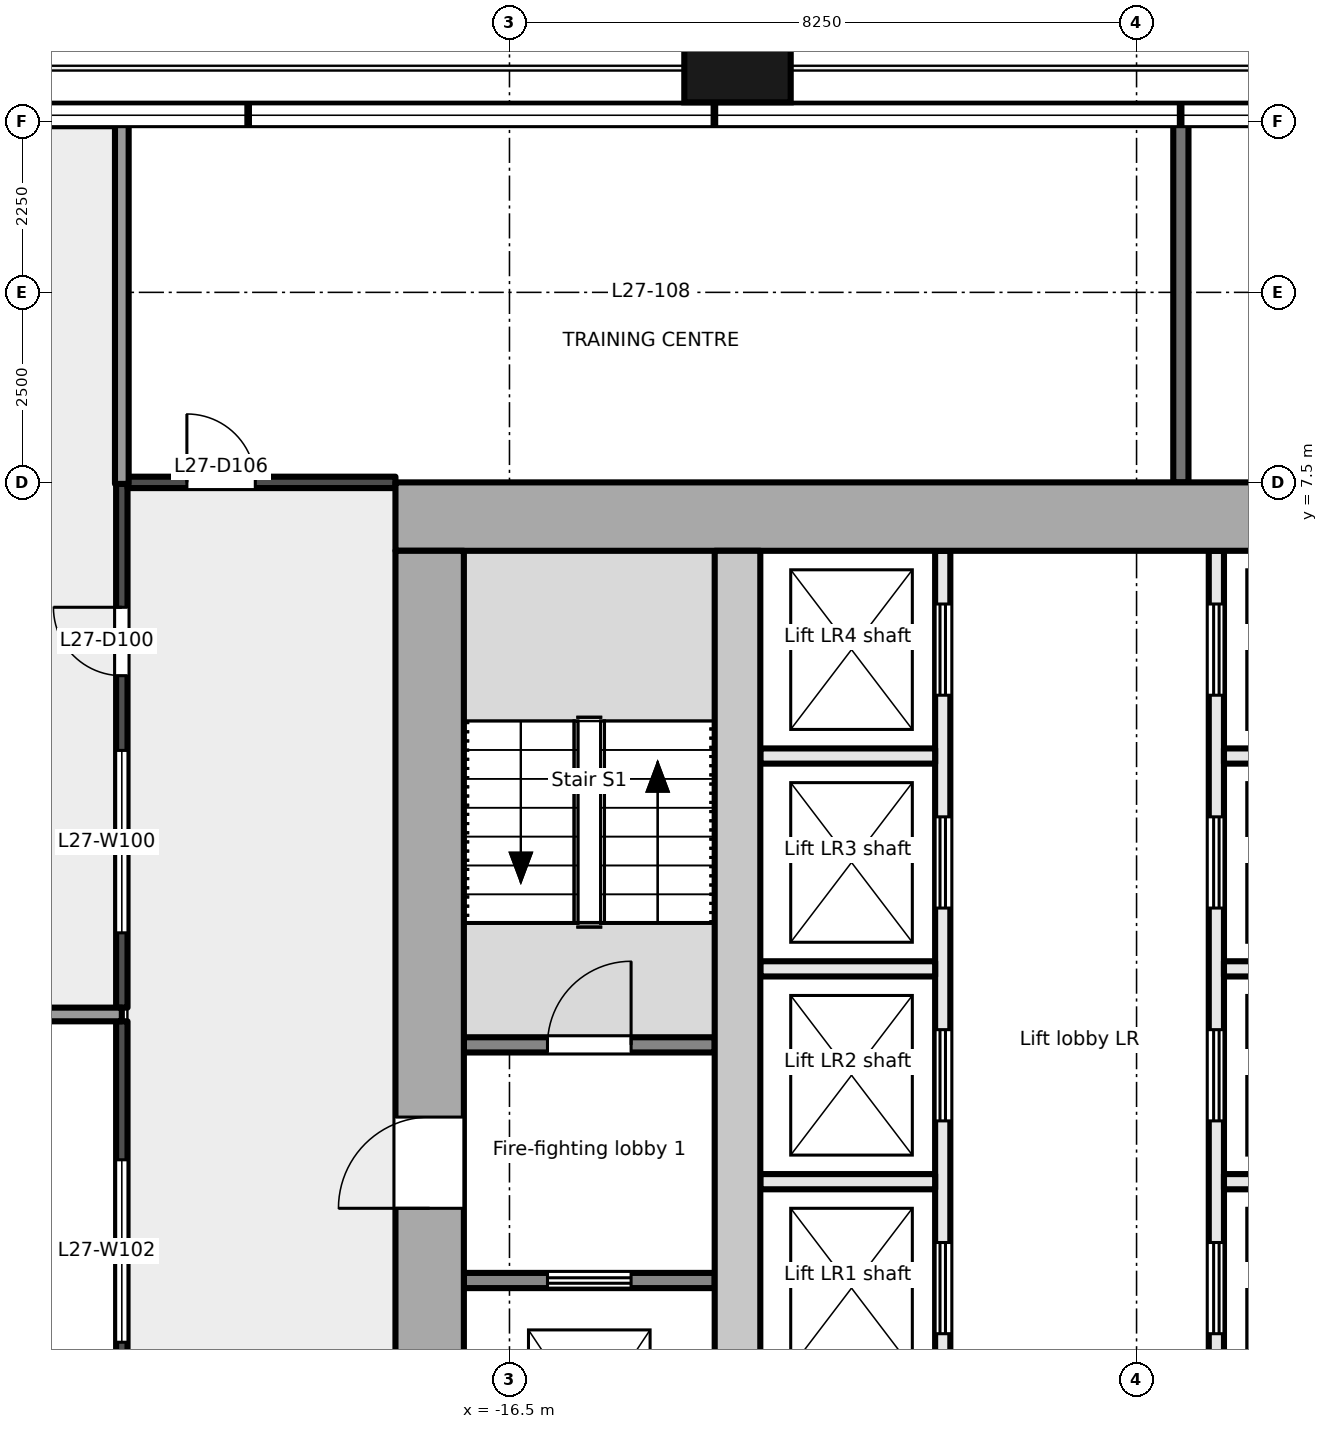
"""IFC4 building model, lengths in metres.
Left out: names, types, materials, properties, quantities, classifications, styles, units other than length and angle.
Written with IfcOpenShell. Run it as: python <this file> out.ifc"""

import sys

from ifc_helpers import new_model, si_unit, direction, frame, frame_2d, origin, origin_2d, place, context, subcontext, project, spatial, rectangle, extrude, element, fill, save


model = new_model("IFC4")
c1 = context("Model", 3, precision=1e-05, world=origin(), true_north=direction((0.0, 1.0)))
c2 = subcontext(c1, "Body", "Model", "MODEL_VIEW")
j1 = project(units=[si_unit("LENGTHUNIT", "METRE"), si_unit("PLANEANGLEUNIT", "RADIAN")], contexts=[c1])
p1 = place(None, origin())
s1 = spatial("IfcSite", under=j1, at=p1, CompositionType="ELEMENT")
p2 = place(p1, origin())
s2 = spatial("IfcBuilding", under=s1, at=p2, CompositionType="ELEMENT")
p3 = place(p2, frame((0.0, 0.0, 120.7)))
s3 = spatial("IfcBuildingStorey", under=s2, at=p3, CompositionType="ELEMENT", Elevation=120.7)
p4 = place(p3, frame((-13.5, 13.4, -0.2), z_axis=(0.0, 0.0, 1.0), x_axis=(1.0, 0.0, 0.0)))
e1 = element("IfcColumn", 1, at=p4, inside=s3, PredefinedType="COLUMN", context=c2, shape_type="SweptSolid", body=[
    extrude(rectangle(XDim=1.4, YDim=1.8, at=origin_2d()), origin(), (0.0, 0.0, 1.0), 5.4),
])
p5 = place(p3, frame((-18.0, 7.05, -0.2), z_axis=(0.0, 0.0, 1.0), x_axis=(1.0, 0.0, 0.0)))
e2 = element("IfcWall", 2, at=p5, inside=s3, PredefinedType="SHEAR", context=c2, shape_type="SweptSolid", body=[
    extrude(rectangle(XDim=36.0, YDim=0.9, at=frame_2d((18.0, 0.0))), origin(), (0.0, 0.0, 1.0), 5.4),
])
p6 = place(p3, frame((-17.55, -6.6, -0.2), z_axis=(0.0, 0.0, 1.0), x_axis=(0.0, 1.0, 0.0)))
e3 = element("IfcWall", 3, at=p6, inside=s3, PredefinedType="SHEAR", context=c2, shape_type="SweptSolid", body=[
    extrude(rectangle(XDim=13.2, YDim=0.9, at=frame_2d((6.6, 0.0))), origin(), (0.0, 0.0, 1.0), 5.4),
])
p7 = place(p6, frame((4.55, 0.0, 0.2)))
e4 = element("IfcOpeningElement", 4, at=p7, cuts=e3, PredefinedType="OPENING", context=c2, shape_type="SweptSolid", body=[
    extrude(rectangle(XDim=1.2, YDim=2.1, at=frame_2d((0.6, 1.05))), frame((0.0, 0.46, 0.0), z_axis=(0.0, -1.0, 0.0), x_axis=(1.0, 0.0, 0.0)), (0.0, 0.0, 1.0), 0.921),
])
p8 = place(p3, frame((-13.5, -6.6, -0.2), z_axis=(0.0, 0.0, 1.0), x_axis=(0.0, 1.0, 0.0)))
e5 = element("IfcWall", 5, at=p8, inside=s3, PredefinedType="SHEAR", context=c2, shape_type="SweptSolid", body=[
    extrude(rectangle(XDim=13.2, YDim=0.6, at=frame_2d((6.6, 0.0))), origin(), (0.0, 0.0, 1.0), 5.4),
])
p9 = place(p3, frame((-17.1, -3.0, 0.0), z_axis=(0.0, 0.0, 1.0), x_axis=(1.0, 0.0, 0.0)))
e6 = element("IfcWall", 6, at=p9, inside=s3, PredefinedType="PARTITIONING", context=c2, shape_type="SweptSolid", body=[
    extrude(rectangle(XDim=3.3, YDim=0.2, at=frame_2d((1.65, 0.0))), origin(), (0.0, 0.0, 1.0), 5.2),
])
p10 = place(p9, frame((1.1, 0.0, 0.0)))
e7 = element("IfcOpeningElement", 7, at=p10, cuts=e6, PredefinedType="OPENING", context=c2, shape_type="SweptSolid", body=[
    extrude(rectangle(XDim=1.1, YDim=2.1, at=frame_2d((0.55, 1.05))), frame((0.0, 0.111, 0.0), z_axis=(0.0, -1.0, 0.0), x_axis=(1.0, 0.0, 0.0)), (0.0, 0.0, 1.0), 0.221),
])
p11 = place(p3, frame((-17.1, 0.1, 0.0), z_axis=(0.0, 0.0, 1.0), x_axis=(1.0, 0.0, 0.0)))
e8 = element("IfcWall", 8, at=p11, inside=s3, PredefinedType="PARTITIONING", context=c2, shape_type="SweptSolid", body=[
    extrude(rectangle(XDim=3.3, YDim=0.2, at=frame_2d((1.65, 0.0))), origin(), (0.0, 0.0, 1.0), 5.2),
])
p12 = place(p11, frame((1.1, 0.0, 0.0)))
e9 = element("IfcOpeningElement", 9, at=p12, cuts=e8, PredefinedType="OPENING", context=c2, shape_type="SweptSolid", body=[
    extrude(rectangle(XDim=1.1, YDim=2.1, at=frame_2d((0.55, 1.05))), frame((0.0, 0.111, 0.0), z_axis=(0.0, -1.0, 0.0), x_axis=(1.0, 0.0, 0.0)), (0.0, 0.0, 1.0), 0.221),
])
p13 = place(p3, frame((-10.8, -6.6, 0.0), z_axis=(0.0, 0.0, 1.0), x_axis=(0.0, 1.0, 0.0)))
e10 = element("IfcWall", 10, at=p13, inside=s3, PredefinedType="PARTITIONING", context=c2, shape_type="SweptSolid", body=[
    extrude(rectangle(XDim=13.2, YDim=0.2, at=frame_2d((6.6, 0.0))), origin(), (0.0, 0.0, 1.0), 5.2),
])
p14 = place(p13, frame((0.55, 0.0, 0.0)))
e11 = element("IfcOpeningElement", 11, at=p14, cuts=e10, PredefinedType="OPENING", context=c2, shape_type="SweptSolid", body=[
    extrude(rectangle(XDim=0.9, YDim=2.1, at=frame_2d((0.45, 1.05))), frame((0.0, 0.111, 0.0), z_axis=(0.0, -1.0, 0.0), x_axis=(1.0, 0.0, 0.0)), (0.0, 0.0, 1.0), 0.221),
])
p15 = place(p13, frame((2.9, 0.0, 0.0)))
e12 = element("IfcOpeningElement", 12, at=p15, cuts=e10, PredefinedType="OPENING", context=c2, shape_type="SweptSolid", body=[
    extrude(rectangle(XDim=1.2, YDim=2.1, at=frame_2d((0.6, 1.05))), frame((0.0, 0.111, 0.0), z_axis=(0.0, -1.0, 0.0), x_axis=(1.0, 0.0, 0.0)), (0.0, 0.0, 1.0), 0.221),
])
p16 = place(p13, frame((5.7, 0.0, 0.0)))
e13 = element("IfcOpeningElement", 13, at=p16, cuts=e10, PredefinedType="OPENING", context=c2, shape_type="SweptSolid", body=[
    extrude(rectangle(XDim=1.2, YDim=2.1, at=frame_2d((0.6, 1.05))), frame((0.0, 0.111, 0.0), z_axis=(0.0, -1.0, 0.0), x_axis=(1.0, 0.0, 0.0)), (0.0, 0.0, 1.0), 0.221),
])
p17 = place(p13, frame((8.5, 0.0, 0.0)))
e14 = element("IfcOpeningElement", 14, at=p17, cuts=e10, PredefinedType="OPENING", context=c2, shape_type="SweptSolid", body=[
    extrude(rectangle(XDim=1.2, YDim=2.1, at=frame_2d((0.6, 1.05))), frame((0.0, 0.111, 0.0), z_axis=(0.0, -1.0, 0.0), x_axis=(1.0, 0.0, 0.0)), (0.0, 0.0, 1.0), 0.221),
])
p18 = place(p13, frame((11.3, 0.0, 0.0)))
e15 = element("IfcOpeningElement", 15, at=p18, cuts=e10, PredefinedType="OPENING", context=c2, shape_type="SweptSolid", body=[
    extrude(rectangle(XDim=1.2, YDim=2.1, at=frame_2d((0.6, 1.05))), frame((0.0, 0.111, 0.0), z_axis=(0.0, -1.0, 0.0), x_axis=(1.0, 0.0, 0.0)), (0.0, 0.0, 1.0), 0.221),
])
p19 = place(p3, frame((-7.2, -6.6, 0.0), z_axis=(0.0, 0.0, 1.0), x_axis=(0.0, 1.0, 0.0)))
e16 = element("IfcWall", 16, at=p19, inside=s3, PredefinedType="PARTITIONING", context=c2, shape_type="SweptSolid", body=[
    extrude(rectangle(XDim=13.2, YDim=0.2, at=frame_2d((6.6, 0.0))), origin(), (0.0, 0.0, 1.0), 5.2),
])
p20 = place(p19, frame((0.55, 0.0, 0.0)))
e17 = element("IfcOpeningElement", 17, at=p20, cuts=e16, PredefinedType="OPENING", context=c2, shape_type="SweptSolid", body=[
    extrude(rectangle(XDim=0.9, YDim=2.1, at=frame_2d((0.45, 1.05))), frame((0.0, 0.111, 0.0), z_axis=(0.0, -1.0, 0.0), x_axis=(1.0, 0.0, 0.0)), (0.0, 0.0, 1.0), 0.221),
])
p21 = place(p19, frame((2.9, 0.0, 0.0)))
e18 = element("IfcOpeningElement", 18, at=p21, cuts=e16, PredefinedType="OPENING", context=c2, shape_type="SweptSolid", body=[
    extrude(rectangle(XDim=1.2, YDim=2.1, at=frame_2d((0.6, 1.05))), frame((0.0, 0.111, 0.0), z_axis=(0.0, -1.0, 0.0), x_axis=(1.0, 0.0, 0.0)), (0.0, 0.0, 1.0), 0.221),
])
p22 = place(p19, frame((5.7, 0.0, 0.0)))
e19 = element("IfcOpeningElement", 19, at=p22, cuts=e16, PredefinedType="OPENING", context=c2, shape_type="SweptSolid", body=[
    extrude(rectangle(XDim=1.2, YDim=2.1, at=frame_2d((0.6, 1.05))), frame((0.0, 0.111, 0.0), z_axis=(0.0, -1.0, 0.0), x_axis=(1.0, 0.0, 0.0)), (0.0, 0.0, 1.0), 0.221),
])
p23 = place(p19, frame((8.5, 0.0, 0.0)))
e20 = element("IfcOpeningElement", 20, at=p23, cuts=e16, PredefinedType="OPENING", context=c2, shape_type="SweptSolid", body=[
    extrude(rectangle(XDim=1.2, YDim=2.1, at=frame_2d((0.6, 1.05))), frame((0.0, 0.111, 0.0), z_axis=(0.0, -1.0, 0.0), x_axis=(1.0, 0.0, 0.0)), (0.0, 0.0, 1.0), 0.221),
])
p24 = place(p19, frame((11.3, 0.0, 0.0)))
e21 = element("IfcOpeningElement", 21, at=p24, cuts=e16, PredefinedType="OPENING", context=c2, shape_type="SweptSolid", body=[
    extrude(rectangle(XDim=1.2, YDim=2.1, at=frame_2d((0.6, 1.05))), frame((0.0, 0.111, 0.0), z_axis=(0.0, -1.0, 0.0), x_axis=(1.0, 0.0, 0.0)), (0.0, 0.0, 1.0), 0.221),
])
for number, where, z_axis, x_axis in (
    (22, (-13.2, -1.7, 0.0), (0.0, 0.0, 1.0), (1.0, 0.0, 0.0)),
    (23, (-13.2, 1.1, 0.0), (0.0, 0.0, 1.0), (1.0, 0.0, 0.0)),
    (24, (-13.2, 3.9, 0.0), (0.0, 0.0, 1.0), (1.0, 0.0, 0.0)),
    (25, (-7.1, -1.7, 0.0), (0.0, 0.0, 1.0), (1.0, 0.0, 0.0)),
    (26, (-7.1, 1.1, 0.0), (0.0, 0.0, 1.0), (1.0, 0.0, 0.0)),
    (27, (-7.1, 3.9, 0.0), (0.0, 0.0, 1.0), (1.0, 0.0, 0.0)),
):
    element("IfcWall", number, at=place(p3, frame(where, z_axis=z_axis, x_axis=x_axis)), inside=s3, PredefinedType="PARTITIONING", context=c2, shape_type="SweptSolid", body=[
        extrude(rectangle(XDim=2.3, YDim=0.2, at=frame_2d((1.15, 0.0))), origin(), (0.0, 0.0, 1.0), 5.2),
    ])
p25 = place(p3, frame((-21.6, 0.59, 0.0), z_axis=(0.0, 0.0, 1.0), x_axis=(0.0, 1.0, 0.0)))
e28 = element("IfcWall", 28, at=p25, inside=s3, PredefinedType="PARTITIONING", context=c2, shape_type="SweptSolid", body=[
    extrude(rectangle(XDim=6.89, YDim=0.15, at=frame_2d((3.445, 0.0))), origin(), (0.0, 0.0, 1.0), 4.7),
])
p26 = place(p25, frame((4.367, 0.0, 0.0)))
e29 = element("IfcOpeningElement", 29, at=p26, cuts=e28, PredefinedType="OPENING", context=c2, shape_type="SweptSolid", body=[
    extrude(rectangle(XDim=0.9, YDim=2.1, at=frame_2d((0.45, 1.05))), frame((0.0, 0.085, 0.0), z_axis=(0.0, -1.0, 0.0), x_axis=(1.0, 0.0, 0.0)), (0.0, 0.0, 1.0), 0.171),
])
p27 = place(p25, frame((0.984, 0.0, 0.0)))
e30 = element("IfcOpeningElement", 30, at=p27, cuts=e28, PredefinedType="OPENING", context=c2, shape_type="SweptSolid", body=[
    extrude(rectangle(XDim=2.4, YDim=2.4, at=frame_2d((1.2, 1.2))), frame((0.0, 0.085, 0.0), z_axis=(0.0, -1.0, 0.0), x_axis=(1.0, 0.0, 0.0)), (0.0, 0.0, 1.0), 0.171),
])
p28 = place(p3, frame((-21.6, -13.48, 0.0), z_axis=(0.0, 0.0, 1.0), x_axis=(0.0, 1.0, 0.0)))
e31 = element("IfcWall", 31, at=p28, inside=s3, PredefinedType="PARTITIONING", context=c2, shape_type="SweptSolid", body=[
    extrude(rectangle(XDim=13.89, YDim=0.15, at=frame_2d((6.945, 0.0))), origin(), (0.0, 0.0, 1.0), 4.7),
])
p29 = place(p28, frame((6.045, 0.0, 0.0)))
e32 = element("IfcOpeningElement", 32, at=p29, cuts=e31, PredefinedType="OPENING", context=c2, shape_type="SweptSolid", body=[
    extrude(rectangle(XDim=1.8, YDim=2.1, at=frame_2d((0.9, 1.05))), frame((0.0, 0.085, 0.0), z_axis=(0.0, -1.0, 0.0), x_axis=(1.0, 0.0, 0.0)), (0.0, 0.0, 1.0), 0.171),
])
p30 = place(p28, frame((9.668, 0.0, 0.0)))
e33 = element("IfcOpeningElement", 33, at=p30, cuts=e31, PredefinedType="OPENING", context=c2, shape_type="SweptSolid", body=[
    extrude(rectangle(XDim=2.4, YDim=2.4, at=frame_2d((1.2, 1.2))), frame((0.0, 0.085, 0.0), z_axis=(0.0, -1.0, 0.0), x_axis=(1.0, 0.0, 0.0)), (0.0, 0.0, 1.0), 0.171),
])
p31 = place(p3, frame((-21.525, 7.5, 0.0), z_axis=(0.0, 0.0, 1.0), x_axis=(1.0, 0.0, 0.0)))
e34 = element("IfcWall", 34, at=p31, inside=s3, PredefinedType="PARTITIONING", context=c2, shape_type="SweptSolid", body=[
    extrude(rectangle(XDim=3.525, YDim=0.15, at=frame_2d((1.762, 0.0))), origin(), (0.0, 0.0, 1.0), 5.2),
])
p32 = place(p31, frame((0.781, 0.0, 0.0)))
e35 = element("IfcOpeningElement", 35, at=p32, cuts=e34, PredefinedType="OPENING", context=c2, shape_type="SweptSolid", body=[
    extrude(rectangle(XDim=0.9, YDim=2.1, at=frame_2d((0.45, 1.05))), frame((0.0, 0.085, 0.0), z_axis=(0.0, -1.0, 0.0), x_axis=(1.0, 0.0, 0.0)), (0.0, 0.0, 1.0), 0.171),
])
p33 = place(p3, frame((-21.6, 0.5, 0.0), z_axis=(0.0, 0.0, 1.0), x_axis=(-1.0, 0.0, 0.0)))
e36 = element("IfcWall", 36, at=p33, inside=s3, PredefinedType="PARTITIONING", context=c2, shape_type="SweptSolid", body=[
    extrude(rectangle(XDim=7.14, YDim=0.18, at=frame_2d((3.57, 0.0))), origin(), (0.0, 0.0, 1.0), 5.2),
])
p34 = place(p3, frame((-21.6, 12.24, 0.0), z_axis=(0.0, 0.0, 1.0), x_axis=(0.0, -1.0, 0.0)))
e37 = element("IfcWall", 37, at=p34, inside=s3, PredefinedType="PARTITIONING", context=c2, shape_type="SweptSolid", body=[
    extrude(rectangle(XDim=4.76, YDim=0.18, at=frame_2d((2.38, 0.0))), origin(), (0.0, 0.0, 1.0), 5.2),
])
p35 = place(p3, frame((-7.667, 12.24, 0.0), z_axis=(0.0, 0.0, 1.0), x_axis=(0.0, -1.0, 0.0)))
e38 = element("IfcWall", 38, at=p35, inside=s3, PredefinedType="PARTITIONING", context=c2, shape_type="SweptSolid", body=[
    extrude(rectangle(XDim=4.74, YDim=0.2, at=frame_2d((2.37, 0.0))), origin(), (0.0, 0.0, 1.0), 5.2),
])
p36 = place(p10, origin())
e39 = element("IfcDoor", 39, at=p36, inside=s3, OperationType="DOUBLE_DOOR_SLIDING", PredefinedType="DOOR", context=c2, shape_type="SweptSolid", body=[
    extrude(rectangle(XDim=1.1, YDim=2.1, at=frame_2d((0.55, 1.05))), frame((0.0, 0.025, 0.0), z_axis=(0.0, -1.0, 0.0), x_axis=(1.0, 0.0, 0.0)), (0.0, 0.0, 1.0), 0.05),
])
fill(e7, e39)
p37 = place(p7, origin())
e40 = element("IfcDoor", 40, at=p37, inside=s3, OperationType="SINGLE_SWING_LEFT", PredefinedType="DOOR", context=c2, shape_type="SweptSolid", body=[
    extrude(rectangle(XDim=1.2, YDim=2.1, at=frame_2d((0.6, 1.05))), frame((0.0, 0.025, 0.0), z_axis=(0.0, -1.0, 0.0), x_axis=(1.0, 0.0, 0.0)), (0.0, 0.0, 1.0), 0.05),
])
fill(e4, e40)
p38 = place(p12, origin())
e41 = element("IfcDoor", 41, at=p38, inside=s3, OperationType="SINGLE_SWING_RIGHT", PredefinedType="DOOR", context=c2, shape_type="SweptSolid", body=[
    extrude(rectangle(XDim=1.1, YDim=2.1, at=frame_2d((0.55, 1.05))), frame((0.0, 0.025, 0.0), z_axis=(0.0, -1.0, 0.0), x_axis=(1.0, 0.0, 0.0)), (0.0, 0.0, 1.0), 0.05),
])
fill(e9, e41)
p39 = place(p15, origin())
e42 = element("IfcDoor", 42, at=p39, inside=s3, OperationType="DOUBLE_DOOR_SLIDING", PredefinedType="DOOR", context=c2, shape_type="SweptSolid", body=[
    extrude(rectangle(XDim=1.2, YDim=2.1, at=frame_2d((0.6, 1.05))), frame((0.0, 0.025, 0.0), z_axis=(0.0, -1.0, 0.0), x_axis=(1.0, 0.0, 0.0)), (0.0, 0.0, 1.0), 0.05),
])
fill(e12, e42)
p40 = place(p16, origin())
e43 = element("IfcDoor", 43, at=p40, inside=s3, OperationType="DOUBLE_DOOR_SLIDING", PredefinedType="DOOR", context=c2, shape_type="SweptSolid", body=[
    extrude(rectangle(XDim=1.2, YDim=2.1, at=frame_2d((0.6, 1.05))), frame((0.0, 0.025, 0.0), z_axis=(0.0, -1.0, 0.0), x_axis=(1.0, 0.0, 0.0)), (0.0, 0.0, 1.0), 0.05),
])
fill(e13, e43)
p41 = place(p17, origin())
e44 = element("IfcDoor", 44, at=p41, inside=s3, OperationType="DOUBLE_DOOR_SLIDING", PredefinedType="DOOR", context=c2, shape_type="SweptSolid", body=[
    extrude(rectangle(XDim=1.2, YDim=2.1, at=frame_2d((0.6, 1.05))), frame((0.0, 0.025, 0.0), z_axis=(0.0, -1.0, 0.0), x_axis=(1.0, 0.0, 0.0)), (0.0, 0.0, 1.0), 0.05),
])
fill(e14, e44)
p42 = place(p18, origin())
e45 = element("IfcDoor", 45, at=p42, inside=s3, OperationType="DOUBLE_DOOR_SLIDING", PredefinedType="DOOR", context=c2, shape_type="SweptSolid", body=[
    extrude(rectangle(XDim=1.2, YDim=2.1, at=frame_2d((0.6, 1.05))), frame((0.0, 0.025, 0.0), z_axis=(0.0, -1.0, 0.0), x_axis=(1.0, 0.0, 0.0)), (0.0, 0.0, 1.0), 0.05),
])
fill(e15, e45)
p43 = place(p21, origin())
e46 = element("IfcDoor", 46, at=p43, inside=s3, OperationType="DOUBLE_DOOR_SLIDING", PredefinedType="DOOR", context=c2, shape_type="SweptSolid", body=[
    extrude(rectangle(XDim=1.2, YDim=2.1, at=frame_2d((0.6, 1.05))), frame((0.0, 0.025, 0.0), z_axis=(0.0, -1.0, 0.0), x_axis=(1.0, 0.0, 0.0)), (0.0, 0.0, 1.0), 0.05),
])
fill(e18, e46)
p44 = place(p22, origin())
e47 = element("IfcDoor", 47, at=p44, inside=s3, OperationType="DOUBLE_DOOR_SLIDING", PredefinedType="DOOR", context=c2, shape_type="SweptSolid", body=[
    extrude(rectangle(XDim=1.2, YDim=2.1, at=frame_2d((0.6, 1.05))), frame((0.0, 0.025, 0.0), z_axis=(0.0, -1.0, 0.0), x_axis=(1.0, 0.0, 0.0)), (0.0, 0.0, 1.0), 0.05),
])
fill(e19, e47)
p45 = place(p23, origin())
e48 = element("IfcDoor", 48, at=p45, inside=s3, OperationType="DOUBLE_DOOR_SLIDING", PredefinedType="DOOR", context=c2, shape_type="SweptSolid", body=[
    extrude(rectangle(XDim=1.2, YDim=2.1, at=frame_2d((0.6, 1.05))), frame((0.0, 0.025, 0.0), z_axis=(0.0, -1.0, 0.0), x_axis=(1.0, 0.0, 0.0)), (0.0, 0.0, 1.0), 0.05),
])
fill(e20, e48)
p46 = place(p24, origin())
e49 = element("IfcDoor", 49, at=p46, inside=s3, OperationType="DOUBLE_DOOR_SLIDING", PredefinedType="DOOR", context=c2, shape_type="SweptSolid", body=[
    extrude(rectangle(XDim=1.2, YDim=2.1, at=frame_2d((0.6, 1.05))), frame((0.0, 0.025, 0.0), z_axis=(0.0, -1.0, 0.0), x_axis=(1.0, 0.0, 0.0)), (0.0, 0.0, 1.0), 0.05),
])
fill(e21, e49)
p47 = place(p26, origin())
e50 = element("IfcDoor", 50, at=p47, inside=s3, OperationType="SINGLE_SWING_RIGHT", PredefinedType="DOOR", context=c2, shape_type="SweptSolid", body=[
    extrude(rectangle(XDim=0.9, YDim=2.1, at=frame_2d((0.45, 1.05))), frame((0.0, 0.025, 0.0), z_axis=(0.0, -1.0, 0.0), x_axis=(1.0, 0.0, 0.0)), (0.0, 0.0, 1.0), 0.05),
])
fill(e29, e50)
p48 = place(p32, origin())
e51 = element("IfcDoor", 51, at=p48, inside=s3, OperationType="SINGLE_SWING_LEFT", PredefinedType="DOOR", context=c2, shape_type="SweptSolid", body=[
    extrude(rectangle(XDim=0.9, YDim=2.1, at=frame_2d((0.45, 1.05))), frame((0.0, 0.025, 0.0), z_axis=(0.0, -1.0, 0.0), x_axis=(1.0, 0.0, 0.0)), (0.0, 0.0, 1.0), 0.05),
])
fill(e35, e51)
p49 = place(p27, origin())
e52 = element("IfcWindow", 52, at=p49, inside=s3, PartitioningType="SINGLE_PANEL", PredefinedType="WINDOW", context=c2, shape_type="SweptSolid", body=[
    extrude(rectangle(XDim=2.4, YDim=2.4, at=frame_2d((1.2, 1.2))), frame((0.0, 0.03, 0.0), z_axis=(0.0, -1.0, 0.0), x_axis=(1.0, 0.0, 0.0)), (0.0, 0.0, 1.0), 0.06),
])
fill(e30, e52)
p50 = place(p30, origin())
e53 = element("IfcWindow", 53, at=p50, inside=s3, PartitioningType="SINGLE_PANEL", PredefinedType="WINDOW", context=c2, shape_type="SweptSolid", body=[
    extrude(rectangle(XDim=2.4, YDim=2.4, at=frame_2d((1.2, 1.2))), frame((0.0, 0.03, 0.0), z_axis=(0.0, -1.0, 0.0), x_axis=(1.0, 0.0, 0.0)), (0.0, 0.0, 1.0), 0.06),
])
fill(e33, e53)
save(model, sys.argv[1])
